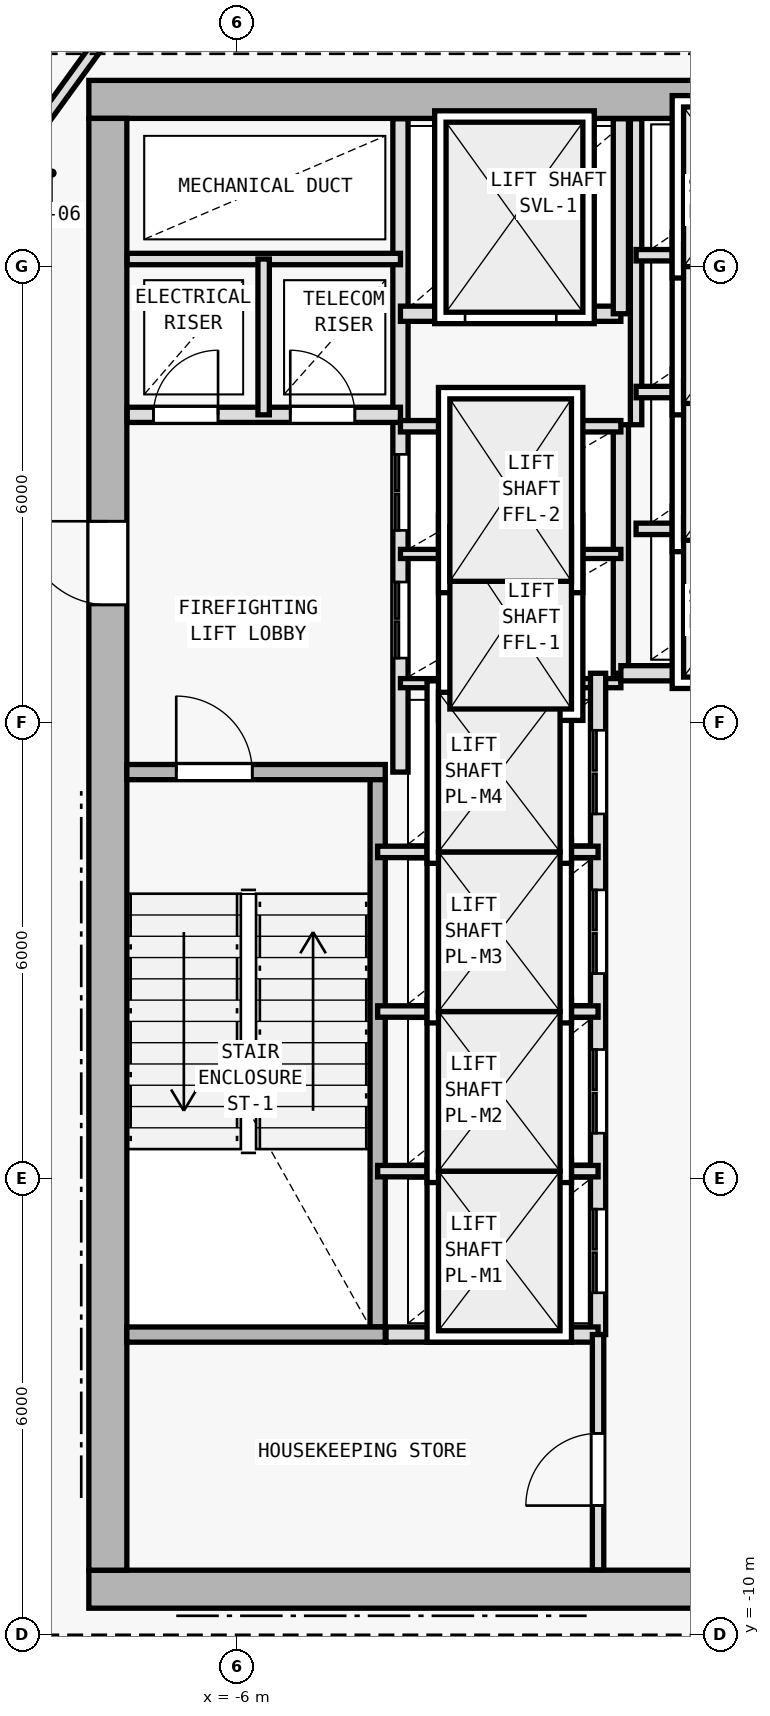
"""IFC4 building model, lengths in metres.
Left out: names, types, materials, properties, quantities, classifications, styles, units other than length and angle.
Written with IfcOpenShell. Run it as: python <this file> out.ifc"""

import sys

from ifc_helpers import new_model, si_unit, direction, frame, frame_2d, origin, origin_2d, place, context, subcontext, project, spatial, rectangle, i_section, extrude, element, fill, save


model = new_model("IFC4")
c1 = context("Model", 3, precision=1e-05, world=origin(), true_north=direction((0.0, 1.0)))
c2 = subcontext(c1, "Body", "Model", "MODEL_VIEW")
j1 = project(units=[si_unit("LENGTHUNIT", "METRE"), si_unit("PLANEANGLEUNIT", "RADIAN")], contexts=[c1])
p1 = place(None, origin())
s1 = spatial("IfcSite", under=j1, at=p1, CompositionType="ELEMENT")
p2 = place(p1, origin())
s2 = spatial("IfcBuilding", under=s1, at=p2, CompositionType="ELEMENT")
p3 = place(p2, frame((0.0, 0.0, 190.2)))
s3 = spatial("IfcBuildingStorey", under=s2, at=p3, CompositionType="ELEMENT", Elevation=190.2)
for number, where, z_axis, x_axis in (
    (1, (-7.7, -9.4, 0.0), (0.0, 0.0, 1.0), (1.0, 0.0, 0.0)),
    (2, (-7.7, 10.2, 0.0), (0.0, 0.0, 1.0), (1.0, 0.0, 0.0)),
    (3, (0.0, -9.4, 0.0), (0.0, 0.0, 1.0), (1.0, 0.0, 0.0)),
    (4, (-7.7, 2.0, 0.0), (0.0, 0.0, 1.0), (1.0, 0.0, 0.0)),
):
    element("IfcColumn", number, at=place(p3, frame(where, z_axis=z_axis, x_axis=x_axis)), inside=s3, PredefinedType="COLUMN", context=c2, shape_type="SweptSolid", body=[
        extrude(i_section(OverallWidth=0.404, OverallDepth=0.407, WebThickness=0.017, FlangeThickness=0.028, FilletRadius=0.015, at=origin_2d()), origin(), (0.0, 0.0, 1.0), 4.5),
    ])
p4 = place(p3, frame((-7.95, -9.4, 0.0), z_axis=(0.0, 0.0, 1.0), x_axis=(1.0, 0.0, 0.0)))
e5 = element("IfcWall", 5, at=p4, inside=s3, PredefinedType="SHEAR", context=c2, shape_type="SweptSolid", body=[
    extrude(rectangle(XDim=15.9, YDim=0.5, at=frame_2d((7.95, 0.0))), origin(), (0.0, 0.0, 1.0), 4.25),
])
p5 = place(p4, frame((9.6, 0.0, 0.0)))
e6 = element("IfcOpeningElement", 6, at=p5, cuts=e5, PredefinedType="OPENING", context=c2, shape_type="SweptSolid", body=[
    extrude(rectangle(XDim=1.5, YDim=2.2, at=frame_2d((0.75, 1.1))), frame((0.0, 0.26, 0.0), z_axis=(0.0, -1.0, 0.0), x_axis=(1.0, 0.0, 0.0)), (0.0, 0.0, 1.0), 0.52),
])
p6 = place(p3, frame((7.95, 10.2, 0.0), z_axis=(0.0, 0.0, 1.0), x_axis=(-1.0, 0.0, 0.0)))
e7 = element("IfcWall", 7, at=p6, inside=s3, PredefinedType="SHEAR", context=c2, shape_type="SweptSolid", body=[
    extrude(rectangle(XDim=15.9, YDim=0.5, at=frame_2d((7.95, 0.0))), origin(), (0.0, 0.0, 1.0), 4.25),
])
p7 = place(p6, frame((4.4, 0.0, 0.0)))
e8 = element("IfcOpeningElement", 8, at=p7, cuts=e7, PredefinedType="OPENING", context=c2, shape_type="SweptSolid", body=[
    extrude(rectangle(XDim=1.1, YDim=2.15, at=frame_2d((0.55, 1.075))), frame((0.0, 0.26, 0.0), z_axis=(0.0, -1.0, 0.0), x_axis=(1.0, 0.0, 0.0)), (0.0, 0.0, 1.0), 0.52),
])
p8 = place(p3, frame((-7.7, -9.15, 0.0), z_axis=(0.0, 0.0, 1.0), x_axis=(0.0, 1.0, 0.0)))
e9 = element("IfcWall", 9, at=p8, inside=s3, PredefinedType="SHEAR", context=c2, shape_type="SweptSolid", body=[
    extrude(rectangle(XDim=19.1, YDim=0.5, at=frame_2d((9.55, 0.0))), origin(), (0.0, 0.0, 1.0), 4.25),
])
p9 = place(p8, frame((12.7, 0.0, 0.0)))
e10 = element("IfcOpeningElement", 10, at=p9, cuts=e9, PredefinedType="OPENING", context=c2, shape_type="SweptSolid", body=[
    extrude(rectangle(XDim=1.1, YDim=2.15, at=frame_2d((0.55, 1.075))), frame((0.0, 0.26, 0.0), z_axis=(0.0, -1.0, 0.0), x_axis=(1.0, 0.0, 0.0)), (0.0, 0.0, 1.0), 0.52),
])
p10 = place(p3, frame((-7.45, 1.35, 0.0), z_axis=(0.0, 0.0, 1.0), x_axis=(1.0, 0.0, 0.0)))
e11 = element("IfcWall", 11, at=p10, inside=s3, PredefinedType="SOLIDWALL", context=c2, shape_type="SweptSolid", body=[
    extrude(rectangle(XDim=3.4, YDim=0.2, at=frame_2d((1.7, 0.0))), origin(), (0.0, 0.0, 1.0), 4.25),
])
p11 = place(p10, frame((0.65, 0.0, 0.0)))
e12 = element("IfcOpeningElement", 12, at=p11, cuts=e11, PredefinedType="OPENING", context=c2, shape_type="SweptSolid", body=[
    extrude(rectangle(XDim=1.0, YDim=2.15, at=frame_2d((0.5, 1.075))), frame((0.0, 0.11, 0.0), z_axis=(0.0, -1.0, 0.0), x_axis=(1.0, 0.0, 0.0)), (0.0, 0.0, 1.0), 0.22),
])
p12 = place(p3, frame((-4.15, -5.95, 0.0), z_axis=(0.0, 0.0, 1.0), x_axis=(0.0, 1.0, 0.0)))
e13 = element("IfcWall", 13, at=p12, inside=s3, PredefinedType="SOLIDWALL", context=c2, shape_type="SweptSolid", body=[
    extrude(rectangle(XDim=7.2, YDim=0.2, at=frame_2d((3.6, 0.0))), origin(), (0.0, 0.0, 1.0), 4.25),
])
p13 = place(p3, frame((-3.85, 1.35, 0.0), z_axis=(0.0, 0.0, 1.0), x_axis=(0.0, 1.0, 0.0)))
e14 = element("IfcWall", 14, at=p13, inside=s3, PredefinedType="SOLIDWALL", context=c2, shape_type="SweptSolid", body=[
    extrude(rectangle(XDim=8.595, YDim=0.2, at=frame_2d((4.297, 0.0))), origin(), (0.0, 0.0, 1.0), 4.25),
])
p14 = place(p13, frame((1.5, 0.0, 0.0)))
e15 = element("IfcOpeningElement", 15, at=p14, cuts=e14, PredefinedType="OPENING", context=c2, shape_type="SweptSolid", body=[
    extrude(rectangle(XDim=1.0, YDim=2.15, at=frame_2d((0.5, 1.075))), frame((0.0, 0.11, 0.0), z_axis=(0.0, -1.0, 0.0), x_axis=(1.0, 0.0, 0.0)), (0.0, 0.0, 1.0), 0.22),
])
p15 = place(p13, frame((3.18, 0.0, 0.0)))
e16 = element("IfcOpeningElement", 16, at=p15, cuts=e14, PredefinedType="OPENING", context=c2, shape_type="SweptSolid", body=[
    extrude(rectangle(XDim=1.0, YDim=2.15, at=frame_2d((0.5, 1.075))), frame((0.0, 0.11, 0.0), z_axis=(0.0, -1.0, 0.0), x_axis=(1.0, 0.0, 0.0)), (0.0, 0.0, 1.0), 0.22),
])
p16 = place(p3, frame((-7.445, 6.05, 0.0), z_axis=(0.0, 0.0, 1.0), x_axis=(1.0, 0.0, 0.0)))
e17 = element("IfcWall", 17, at=p16, inside=s3, PredefinedType="SOLIDWALL", context=c2, shape_type="SweptSolid", body=[
    extrude(rectangle(XDim=3.595, YDim=0.2, at=frame_2d((1.797, 0.0))), origin(), (0.0, 0.0, 1.0), 4.25),
])
p17 = place(p16, frame((0.345, 0.0, 0.0)))
e18 = element("IfcOpeningElement", 18, at=p17, cuts=e17, PredefinedType="OPENING", context=c2, shape_type="SweptSolid", body=[
    extrude(rectangle(XDim=0.85, YDim=2.1, at=frame_2d((0.425, 1.05))), frame((0.0, 0.11, 0.0), z_axis=(0.0, -1.0, 0.0), x_axis=(1.0, 0.0, 0.0)), (0.0, 0.0, 1.0), 0.22),
])
p18 = place(p16, frame((2.145, 0.0, 0.0)))
e19 = element("IfcOpeningElement", 19, at=p18, cuts=e17, PredefinedType="OPENING", context=c2, shape_type="SweptSolid", body=[
    extrude(rectangle(XDim=0.85, YDim=2.1, at=frame_2d((0.425, 1.05))), frame((0.0, 0.11, 0.0), z_axis=(0.0, -1.0, 0.0), x_axis=(1.0, 0.0, 0.0)), (0.0, 0.0, 1.0), 0.22),
])
p19 = place(p3, frame((-7.445, 8.1, 0.0), z_axis=(0.0, 0.0, 1.0), x_axis=(1.0, 0.0, 0.0)))
e20 = element("IfcWall", 20, at=p19, inside=s3, PredefinedType="PARTITIONING", context=c2, shape_type="SweptSolid", body=[
    extrude(rectangle(XDim=3.595, YDim=0.15, at=frame_2d((1.797, 0.0))), origin(), (0.0, 0.0, 1.0), 4.25),
])
p20 = place(p3, frame((-5.65, 6.05, 0.0), z_axis=(0.0, 0.0, 1.0), x_axis=(0.0, 1.0, 0.0)))
e21 = element("IfcWall", 21, at=p20, inside=s3, PredefinedType="PARTITIONING", context=c2, shape_type="SweptSolid", body=[
    extrude(rectangle(XDim=2.05, YDim=0.15, at=frame_2d((1.025, 0.0))), origin(), (0.0, 0.0, 1.0), 4.25),
])
p21 = place(p3, frame((-0.95, 2.65, 0.0), z_axis=(0.0, 0.0, 1.0), x_axis=(0.0, 1.0, 0.0)))
e22 = element("IfcWall", 22, at=p21, inside=s3, PredefinedType="SOLIDWALL", context=c2, shape_type="SweptSolid", body=[
    extrude(rectangle(XDim=3.27, YDim=0.2, at=frame_2d((1.635, 0.0))), origin(), (0.0, 0.0, 1.0), 4.25),
])
for number, where, z_axis, x_axis in (
    (23, (-3.85, 2.52, 0.0), (0.0, 0.0, 1.0), (1.0, 0.0, 0.0)),
    (24, (-3.85, 4.22, 0.0), (0.0, 0.0, 1.0), (1.0, 0.0, 0.0)),
):
    element("IfcWall", number, at=place(p3, frame(where, z_axis=z_axis, x_axis=x_axis)), inside=s3, PredefinedType="PARTITIONING", context=c2, shape_type="SweptSolid", body=[
        extrude(rectangle(XDim=2.9, YDim=0.12, at=frame_2d((1.45, 0.0))), origin(), (0.0, 0.0, 1.0), 4.25),
    ])
p22 = place(p3, frame((-3.85, 5.9, 0.0), z_axis=(0.0, 0.0, 1.0), x_axis=(1.0, 0.0, 0.0)))
e25 = element("IfcWall", 25, at=p22, inside=s3, PredefinedType="PARTITIONING", context=c2, shape_type="SweptSolid", body=[
    extrude(rectangle(XDim=2.9, YDim=0.15, at=frame_2d((1.45, 0.0))), origin(), (0.0, 0.0, 1.0), 4.25),
])
p23 = place(p3, frame((-3.85, 7.38, 0.0), z_axis=(0.0, 0.0, 1.0), x_axis=(1.0, 0.0, 0.0)))
e26 = element("IfcWall", 26, at=p23, inside=s3, PredefinedType="SOLIDWALL", context=c2, shape_type="SweptSolid", body=[
    extrude(rectangle(XDim=2.9, YDim=0.2, at=frame_2d((1.45, 0.0))), origin(), (0.0, 0.0, 1.0), 4.25),
])
p24 = place(p23, frame((0.85, 0.0, 0.0)))
e27 = element("IfcOpeningElement", 27, at=p24, cuts=e26, PredefinedType="OPENING", context=c2, shape_type="SweptSolid", body=[
    extrude(rectangle(XDim=1.2, YDim=2.2, at=frame_2d((0.6, 1.1))), frame((0.0, 0.11, 0.0), z_axis=(0.0, -1.0, 0.0), x_axis=(1.0, 0.0, 0.0)), (0.0, 0.0, 1.0), 0.22),
])
p25 = place(p3, frame((-0.95, 7.38, 0.0), z_axis=(0.0, 0.0, 1.0), x_axis=(0.0, 1.0, 0.0)))
e28 = element("IfcWall", 28, at=p25, inside=s3, PredefinedType="SOLIDWALL", context=c2, shape_type="SweptSolid", body=[
    extrude(rectangle(XDim=2.565, YDim=0.2, at=frame_2d((1.283, 0.0))), origin(), (0.0, 0.0, 1.0), 4.25),
])
p26 = place(p3, frame((-1.25, -6.05, 0.0), z_axis=(0.0, 0.0, 1.0), x_axis=(0.0, 1.0, 0.0)))
e29 = element("IfcWall", 29, at=p26, inside=s3, PredefinedType="SOLIDWALL", context=c2, shape_type="SweptSolid", body=[
    extrude(rectangle(XDim=8.7, YDim=0.2, at=frame_2d((4.35, 0.0))), origin(), (0.0, 0.0, 1.0), 4.25),
])
p27 = place(p26, frame((0.55, 0.0, 0.0)))
e30 = element("IfcOpeningElement", 30, at=p27, cuts=e29, PredefinedType="OPENING", context=c2, shape_type="SweptSolid", body=[
    extrude(rectangle(XDim=1.1, YDim=2.15, at=frame_2d((0.55, 1.075))), frame((0.0, 0.11, 0.0), z_axis=(0.0, -1.0, 0.0), x_axis=(1.0, 0.0, 0.0)), (0.0, 0.0, 1.0), 0.22),
])
p28 = place(p26, frame((2.65, 0.0, 0.0)))
e31 = element("IfcOpeningElement", 31, at=p28, cuts=e29, PredefinedType="OPENING", context=c2, shape_type="SweptSolid", body=[
    extrude(rectangle(XDim=1.1, YDim=2.15, at=frame_2d((0.55, 1.075))), frame((0.0, 0.11, 0.0), z_axis=(0.0, -1.0, 0.0), x_axis=(1.0, 0.0, 0.0)), (0.0, 0.0, 1.0), 0.22),
])
p29 = place(p26, frame((4.75, 0.0, 0.0)))
e32 = element("IfcOpeningElement", 32, at=p29, cuts=e29, PredefinedType="OPENING", context=c2, shape_type="SweptSolid", body=[
    extrude(rectangle(XDim=1.1, YDim=2.15, at=frame_2d((0.55, 1.075))), frame((0.0, 0.11, 0.0), z_axis=(0.0, -1.0, 0.0), x_axis=(1.0, 0.0, 0.0)), (0.0, 0.0, 1.0), 0.22),
])
p30 = place(p26, frame((6.85, 0.0, 0.0)))
e33 = element("IfcOpeningElement", 33, at=p30, cuts=e29, PredefinedType="OPENING", context=c2, shape_type="SweptSolid", body=[
    extrude(rectangle(XDim=1.1, YDim=2.15, at=frame_2d((0.55, 1.075))), frame((0.0, 0.11, 0.0), z_axis=(0.0, -1.0, 0.0), x_axis=(1.0, 0.0, 0.0)), (0.0, 0.0, 1.0), 0.22),
])
for number, where, z_axis, x_axis in (
    (34, (-4.15, -3.9, 0.0), (0.0, 0.0, 1.0), (1.0, 0.0, 0.0)),
    (35, (-4.15, -1.8, 0.0), (0.0, 0.0, 1.0), (1.0, 0.0, 0.0)),
    (36, (-4.15, 0.3, 0.0), (0.0, 0.0, 1.0), (1.0, 0.0, 0.0)),
):
    element("IfcWall", number, at=place(p3, frame(where, z_axis=z_axis, x_axis=x_axis)), inside=s3, PredefinedType="PARTITIONING", context=c2, shape_type="SweptSolid", body=[
        extrude(rectangle(XDim=2.9, YDim=0.15, at=frame_2d((1.45, 0.0))), origin(), (0.0, 0.0, 1.0), 4.25),
    ])
p31 = place(p3, frame((-0.95, 2.65, 0.0), z_axis=(0.0, 0.0, 1.0), x_axis=(1.0, 0.0, 0.0)))
e37 = element("IfcWall", 37, at=p31, inside=s3, PredefinedType="SOLIDWALL", context=c2, shape_type="SweptSolid", body=[
    extrude(rectangle(XDim=2.9, YDim=0.2, at=frame_2d((1.45, 0.0))), origin(), (0.0, 0.0, 1.0), 4.25),
])
p32 = place(p3, frame((-0.75, 5.92, 0.0), z_axis=(0.0, 0.0, 1.0), x_axis=(0.0, 1.0, 0.0)))
e38 = element("IfcWall", 38, at=p32, inside=s3, PredefinedType="PARTITIONING", context=c2, shape_type="SweptSolid", body=[
    extrude(rectangle(XDim=4.025, YDim=0.15, at=frame_2d((2.013, 0.0))), origin(), (0.0, 0.0, 1.0), 4.25),
])
for number, where, z_axis, x_axis in (
    (39, (-0.75, 4.55, 0.0), (0.0, 0.0, 1.0), (1.0, 0.0, 0.0)),
    (40, (-0.75, 6.35, 0.0), (0.0, 0.0, 1.0), (1.0, 0.0, 0.0)),
    (41, (-0.75, 8.15, 0.0), (0.0, 0.0, 1.0), (1.0, 0.0, 0.0)),
):
    element("IfcWall", number, at=place(p3, frame(where, z_axis=z_axis, x_axis=x_axis)), inside=s3, PredefinedType="PARTITIONING", context=c2, shape_type="SweptSolid", body=[
        extrude(rectangle(XDim=2.7, YDim=0.15, at=frame_2d((1.35, 0.0))), origin(), (0.0, 0.0, 1.0), 4.25),
    ])
p33 = place(p3, frame((-7.45, -6.05, 0.0), z_axis=(0.0, 0.0, 1.0), x_axis=(1.0, 0.0, 0.0)))
e42 = element("IfcWall", 42, at=p33, inside=s3, PredefinedType="SOLIDWALL", context=c2, shape_type="SweptSolid", body=[
    extrude(rectangle(XDim=3.4, YDim=0.2, at=frame_2d((1.7, 0.0))), origin(), (0.0, 0.0, 1.0), 4.25),
])
p34 = place(p3, frame((-4.04, -6.05, 0.0), z_axis=(0.0, 0.0, 1.0), x_axis=(1.0, 0.0, 0.0)))
e43 = element("IfcWall", 43, at=p34, inside=s3, PredefinedType="SOLIDWALL", context=c2, shape_type="SweptSolid", body=[
    extrude(rectangle(XDim=2.79, YDim=0.2, at=frame_2d((1.395, 0.0))), origin(), (0.0, 0.0, 1.0), 4.25),
])
p35 = place(p3, frame((-1.25, -9.145, 0.0), z_axis=(0.0, 0.0, 1.0), x_axis=(0.0, 1.0, 0.0)))
e44 = element("IfcWall", 44, at=p35, inside=s3, PredefinedType="PARTITIONING", context=c2, shape_type="SweptSolid", body=[
    extrude(rectangle(XDim=3.095, YDim=0.15, at=frame_2d((1.547, 0.0))), origin(), (0.0, 0.0, 1.0), 4.25),
])
p36 = place(p35, frame((0.845, 0.0, 0.0)))
e45 = element("IfcOpeningElement", 45, at=p36, cuts=e44, PredefinedType="OPENING", context=c2, shape_type="SweptSolid", body=[
    extrude(rectangle(XDim=0.95, YDim=2.1, at=frame_2d((0.475, 1.05))), frame((0.0, 0.085, 0.0), z_axis=(0.0, -1.0, 0.0), x_axis=(1.0, 0.0, 0.0)), (0.0, 0.0, 1.0), 0.17),
])
p37 = place(p3, frame((-9.78, 8.226, 0.0), z_axis=(0.0, 0.0, 1.0), x_axis=(0.586956386413, 0.809618552436, 0.0)))
e46 = element("IfcWall", 46, at=p37, inside=s3, PredefinedType="PARTITIONING", context=c2, shape_type="SweptSolid", body=[
    extrude(rectangle(XDim=5.008, YDim=0.15, at=frame_2d((2.504, 0.0))), origin(), (0.0, 0.0, 1.0), 3.905),
])
p38 = place(p37, frame((1.154, 0.0, 0.0)))
e47 = element("IfcOpeningElement", 47, at=p38, cuts=e46, PredefinedType="OPENING", context=c2, shape_type="SweptSolid", body=[
    extrude(rectangle(XDim=0.9, YDim=2.1, at=frame_2d((0.45, 1.05))), frame((0.0, 0.085, 0.0), z_axis=(0.0, -1.0, 0.0), x_axis=(1.0, 0.0, 0.0)), (0.0, 0.0, 1.0), 0.17),
])
p39 = place(p9, origin())
e48 = element("IfcDoor", 48, at=p39, inside=s3, OperationType="SINGLE_SWING_RIGHT", PredefinedType="DOOR", context=c2, shape_type="SweptSolid", body=[
    extrude(rectangle(XDim=1.1, YDim=2.15, at=frame_2d((0.55, 1.075))), frame((0.0, 0.025, 0.0), z_axis=(0.0, -1.0, 0.0), x_axis=(1.0, 0.0, 0.0)), (0.0, 0.0, 1.0), 0.05),
])
fill(e10, e48)
p40 = place(p11, origin())
e49 = element("IfcDoor", 49, at=p40, inside=s3, OperationType="SINGLE_SWING_LEFT", PredefinedType="DOOR", context=c2, shape_type="SweptSolid", body=[
    extrude(rectangle(XDim=1.0, YDim=2.15, at=frame_2d((0.5, 1.075))), frame((0.0, 0.025, 0.0), z_axis=(0.0, -1.0, 0.0), x_axis=(1.0, 0.0, 0.0)), (0.0, 0.0, 1.0), 0.05),
])
fill(e12, e49)
p41 = place(p17, origin())
e50 = element("IfcDoor", 50, at=p41, inside=s3, OperationType="SINGLE_SWING_RIGHT", PredefinedType="DOOR", context=c2, shape_type="SweptSolid", body=[
    extrude(rectangle(XDim=0.85, YDim=2.1, at=frame_2d((0.425, 1.05))), frame((0.0, 0.025, 0.0), z_axis=(0.0, -1.0, 0.0), x_axis=(1.0, 0.0, 0.0)), (0.0, 0.0, 1.0), 0.05),
])
fill(e18, e50)
p42 = place(p18, origin())
e51 = element("IfcDoor", 51, at=p42, inside=s3, OperationType="SINGLE_SWING_LEFT", PredefinedType="DOOR", context=c2, shape_type="SweptSolid", body=[
    extrude(rectangle(XDim=0.85, YDim=2.1, at=frame_2d((0.425, 1.05))), frame((0.0, 0.025, 0.0), z_axis=(0.0, -1.0, 0.0), x_axis=(1.0, 0.0, 0.0)), (0.0, 0.0, 1.0), 0.05),
])
fill(e19, e51)
p43 = place(p24, origin())
e52 = element("IfcDoor", 52, at=p43, inside=s3, OperationType="DOUBLE_DOOR_SLIDING", PredefinedType="DOOR", context=c2, shape_type="SweptSolid", body=[
    extrude(rectangle(XDim=1.2, YDim=2.2, at=frame_2d((0.6, 1.1))), frame((0.0, 0.025, 0.0), z_axis=(0.0, -1.0, 0.0), x_axis=(1.0, 0.0, 0.0)), (0.0, 0.0, 1.0), 0.05),
])
fill(e27, e52)
p44 = place(p27, origin())
e53 = element("IfcDoor", 53, at=p44, inside=s3, OperationType="DOUBLE_DOOR_SLIDING", PredefinedType="DOOR", context=c2, shape_type="SweptSolid", body=[
    extrude(rectangle(XDim=1.1, YDim=2.15, at=frame_2d((0.55, 1.075))), frame((0.0, 0.025, 0.0), z_axis=(0.0, -1.0, 0.0), x_axis=(1.0, 0.0, 0.0)), (0.0, 0.0, 1.0), 0.05),
])
fill(e30, e53)
p45 = place(p28, origin())
e54 = element("IfcDoor", 54, at=p45, inside=s3, OperationType="DOUBLE_DOOR_SLIDING", PredefinedType="DOOR", context=c2, shape_type="SweptSolid", body=[
    extrude(rectangle(XDim=1.1, YDim=2.15, at=frame_2d((0.55, 1.075))), frame((0.0, 0.025, 0.0), z_axis=(0.0, -1.0, 0.0), x_axis=(1.0, 0.0, 0.0)), (0.0, 0.0, 1.0), 0.05),
])
fill(e31, e54)
p46 = place(p29, origin())
e55 = element("IfcDoor", 55, at=p46, inside=s3, OperationType="DOUBLE_DOOR_SLIDING", PredefinedType="DOOR", context=c2, shape_type="SweptSolid", body=[
    extrude(rectangle(XDim=1.1, YDim=2.15, at=frame_2d((0.55, 1.075))), frame((0.0, 0.025, 0.0), z_axis=(0.0, -1.0, 0.0), x_axis=(1.0, 0.0, 0.0)), (0.0, 0.0, 1.0), 0.05),
])
fill(e32, e55)
p47 = place(p30, origin())
e56 = element("IfcDoor", 56, at=p47, inside=s3, OperationType="DOUBLE_DOOR_SLIDING", PredefinedType="DOOR", context=c2, shape_type="SweptSolid", body=[
    extrude(rectangle(XDim=1.1, YDim=2.15, at=frame_2d((0.55, 1.075))), frame((0.0, 0.025, 0.0), z_axis=(0.0, -1.0, 0.0), x_axis=(1.0, 0.0, 0.0)), (0.0, 0.0, 1.0), 0.05),
])
fill(e33, e56)
p48 = place(p14, origin())
e57 = element("IfcDoor", 57, at=p48, inside=s3, OperationType="DOUBLE_DOOR_SLIDING", PredefinedType="DOOR", context=c2, shape_type="SweptSolid", body=[
    extrude(rectangle(XDim=1.0, YDim=2.15, at=frame_2d((0.5, 1.075))), frame((0.0, 0.025, 0.0), z_axis=(0.0, -1.0, 0.0), x_axis=(1.0, 0.0, 0.0)), (0.0, 0.0, 1.0), 0.05),
])
fill(e15, e57)
p49 = place(p15, origin())
e58 = element("IfcDoor", 58, at=p49, inside=s3, OperationType="DOUBLE_DOOR_SLIDING", PredefinedType="DOOR", context=c2, shape_type="SweptSolid", body=[
    extrude(rectangle(XDim=1.0, YDim=2.15, at=frame_2d((0.5, 1.075))), frame((0.0, 0.025, 0.0), z_axis=(0.0, -1.0, 0.0), x_axis=(1.0, 0.0, 0.0)), (0.0, 0.0, 1.0), 0.05),
])
fill(e16, e58)
p50 = place(p36, origin())
e59 = element("IfcDoor", 59, at=p50, inside=s3, OperationType="SINGLE_SWING_LEFT", PredefinedType="DOOR", context=c2, shape_type="SweptSolid", body=[
    extrude(rectangle(XDim=0.95, YDim=2.1, at=frame_2d((0.475, 1.05))), frame((0.0, 0.025, 0.0), z_axis=(0.0, -1.0, 0.0), x_axis=(1.0, 0.0, 0.0)), (0.0, 0.0, 1.0), 0.05),
])
fill(e45, e59)
save(model, sys.argv[1])
